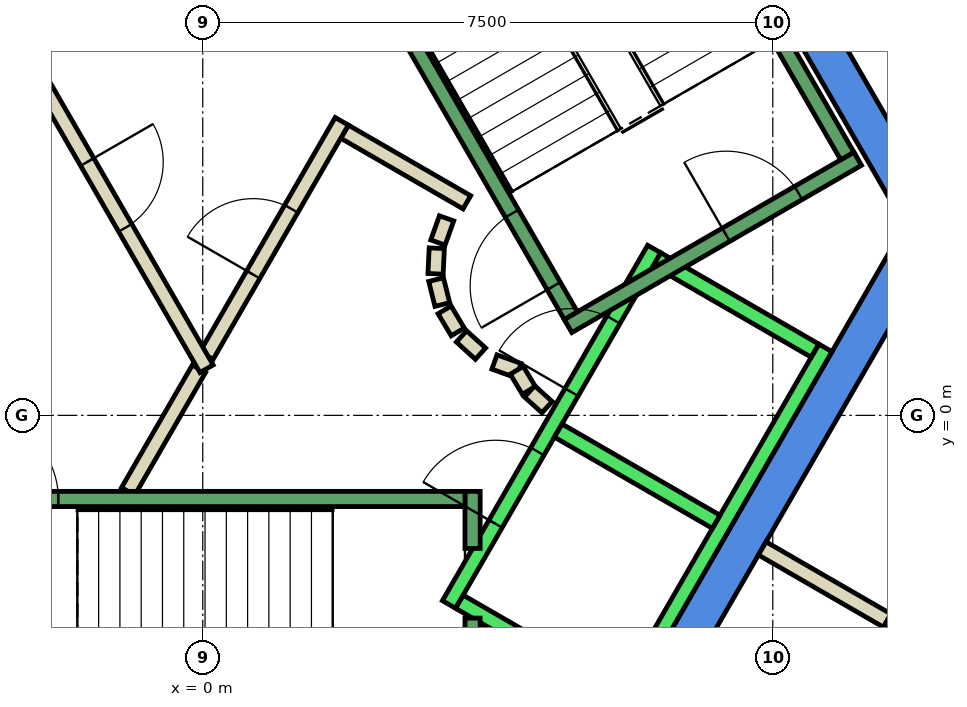
"""IFC4 building model, lengths in metres.
Left out: names, types, materials, properties, quantities, classifications, styles, units other than length and angle.
Written with IfcOpenShell. Run it as: python <this file> out.ifc"""

import sys

from ifc_helpers import new_model, si_unit, direction, frame, frame_2d, origin, place, context, subcontext, project, spatial, polyline, rectangle, outline, extrude, element, fill, save


model = new_model("IFC4")
c1 = context("Model", 3, precision=1e-05, world=origin(), true_north=direction((0.0, 1.0)))
c2 = subcontext(c1, "Body", "Model", "MODEL_VIEW")
j1 = project(units=[si_unit("LENGTHUNIT", "METRE"), si_unit("PLANEANGLEUNIT", "RADIAN")], contexts=[c1])
p1 = place(None, origin())
s1 = spatial("IfcSite", under=j1, at=p1, CompositionType="ELEMENT")
p2 = place(p1, origin())
s2 = spatial("IfcBuilding", under=s1, at=p2, CompositionType="ELEMENT")
p3 = place(p2, frame((0.0, 0.0, 340.4)))
s3 = spatial("IfcBuildingStorey", under=s2, at=p3, CompositionType="ELEMENT", Elevation=340.4)
p4 = place(p3, frame((0.0, 0.0, -0.45)))
e1 = element("IfcWall", 1, at=p4, inside=s3, PredefinedType="SHEAR", context=c2, shape_type="SweptSolid", body=[
    extrude(outline(polyline([(5.486, 9.998), (5.053, 9.748), (9.238, 2.5), (9.815, 2.5), (5.486, 9.998)])), origin(), (0.0, 0.0, 1.0), 4.6),
])
p5 = place(p3, frame((0.0, 0.0, -0.45)))
e2 = element("IfcWall", 2, at=p5, inside=s3, PredefinedType="SHEAR", context=c2, shape_type="SweptSolid", body=[
    extrude(outline(polyline([(4.907, -6.0), (9.815, 2.5), (9.238, 2.5), (4.619, -5.5), (4.907, -6.0)])), origin(), (0.0, 0.0, 1.0), 4.6),
])
p6 = place(p3, frame((-0.982, -1.0, 0.0), z_axis=(0.0, 0.0, 1.0), x_axis=(0.50024047865, 0.865886518847, 0.0)))
e3 = element("IfcWall", 3, at=p6, inside=s3, PredefinedType="PARTITIONING", context=c2, shape_type="SweptSolid", body=[
    extrude(rectangle(XDim=1.863, YDim=0.2, at=frame_2d((0.931, 0.0))), origin(), (0.0, 0.0, 1.0), 4.15),
])
p7 = place(p3, frame((1.866, 3.732, 0.0), z_axis=(0.0, 0.0, 1.0), x_axis=(0.866043361281, -0.499968895414, 0.0)))
e4 = element("IfcWall", 4, at=p7, inside=s3, PredefinedType="PARTITIONING", context=c2, shape_type="SweptSolid", body=[
    extrude(rectangle(XDim=1.858, YDim=0.2, at=frame_2d((0.929, 0.0))), origin(), (0.0, 0.0, 1.0), 4.15),
])
p8 = place(p3, frame((3.208, 2.592, 0.0), z_axis=(0.0, 0.0, 1.0), x_axis=(-0.337388820924, -0.941365382578, 0.0)))
e5 = element("IfcWall", 5, at=p8, inside=s3, PredefinedType="PARTITIONING", context=c2, shape_type="SweptSolid", body=[
    extrude(rectangle(XDim=0.338, YDim=0.2, at=frame_2d((0.169, 0.0))), origin(), (0.0, 0.0, 1.0), 4.15),
])
p9 = place(p3, frame((3.079, 2.199, 0.0), z_axis=(0.0, 0.0, 1.0), x_axis=(-0.047771483479, -0.998858290933, 0.0)))
e6 = element("IfcWall", 6, at=p9, inside=s3, PredefinedType="PARTITIONING", context=c2, shape_type="SweptSolid", body=[
    extrude(rectangle(XDim=0.337, YDim=0.2, at=frame_2d((0.169, 0.0))), origin(), (0.0, 0.0, 1.0), 4.15),
])
p10 = place(p3, frame((3.07, 1.786, 0.0), z_axis=(0.0, 0.0, 1.0), x_axis=(0.242705583207, -0.970099994784, 0.0)))
e7 = element("IfcWall", 7, at=p10, inside=s3, PredefinedType="PARTITIONING", context=c2, shape_type="SweptSolid", body=[
    extrude(rectangle(XDim=0.338, YDim=0.2, at=frame_2d((0.169, 0.0))), origin(), (0.0, 0.0, 1.0), 4.15),
])
for number, where, z_axis, x_axis in (
    (8, (3.182, 1.388, 0.0), (0.0, 0.0, 1.0), (0.512, -0.859, 0.0)),
    (9, (3.404, 1.039, 0.0), (0.0, 0.0, 1.0), (0.74, -0.672, 0.0)),
):
    element("IfcWall", number, at=place(p3, frame(where, z_axis=z_axis, x_axis=x_axis)), inside=s3, PredefinedType="PARTITIONING", context=c2, shape_type="SweptSolid", body=[
        extrude(rectangle(XDim=0.338, YDim=0.2, at=frame_2d((0.169, 0.0))), origin(), (0.0, 0.0, 1.0), 4.15),
    ])
p11 = place(p3, frame((3.838, 0.702, 0.0), z_axis=(0.0, 0.0, 1.0), x_axis=(0.941035081519, -0.338308993895, 0.0)))
e10 = element("IfcWall", 10, at=p11, inside=s3, PredefinedType="PARTITIONING", context=c2, shape_type="SweptSolid", body=[
    extrude(rectangle(XDim=0.337, YDim=0.2, at=frame_2d((0.168, 0.0))), origin(), (0.0, 0.0, 1.0), 4.15),
])
p12 = place(p3, frame((4.132, 0.593, 0.0), z_axis=(0.0, 0.0, 1.0), x_axis=(0.513561617048, -0.858052717201, 0.0)))
e11 = element("IfcWall", 11, at=p12, inside=s3, PredefinedType="PARTITIONING", context=c2, shape_type="SweptSolid", body=[
    extrude(rectangle(XDim=0.308, YDim=0.2, at=frame_2d((0.154, 0.0))), origin(), (0.0, 0.0, 1.0), 4.15),
])
p13 = place(p3, frame((4.301, 0.315, 0.0), z_axis=(0.0, 0.0, 1.0), x_axis=(0.741798017506, -0.670623367639, 0.0)))
e12 = element("IfcWall", 12, at=p13, inside=s3, PredefinedType="PARTITIONING", context=c2, shape_type="SweptSolid", body=[
    extrude(rectangle(XDim=0.309, YDim=0.2, at=frame_2d((0.154, 0.0))), origin(), (0.0, 0.0, 1.0), 4.15),
])
p14 = place(p3, frame((0.05, 0.787, 0.0), z_axis=(0.0, 0.0, 1.0), x_axis=(0.499954076797, 0.866051915934, 0.0)))
e13 = element("IfcWall", 13, at=p14, inside=s3, PredefinedType="PARTITIONING", context=c2, shape_type="SweptSolid", body=[
    extrude(rectangle(XDim=3.558, YDim=0.2, at=frame_2d((1.779, 0.0))), origin(), (0.0, 0.0, 1.0), 4.15),
])
p15 = place(p14, frame((1.229, 0.0, 0.0)))
e14 = element("IfcOpeningElement", 14, at=p15, cuts=e13, PredefinedType="OPENING", context=c2, shape_type="SweptSolid", body=[
    extrude(rectangle(XDim=1.0, YDim=2.1, at=frame_2d((0.5, 1.05))), frame((0.0, 0.11, 0.0), z_axis=(0.0, -1.0, 0.0), x_axis=(1.0, 0.0, 0.0)), (0.0, 0.0, 1.0), 0.22),
])
p16 = place(p3, frame((-2.54, 5.1, 0.0), z_axis=(0.0, 0.0, 1.0), x_axis=(0.499925051871, -0.866068670783, 0.0)))
e15 = element("IfcWall", 15, at=p16, inside=s3, PredefinedType="PARTITIONING", context=c2, shape_type="SweptSolid", body=[
    extrude(rectangle(XDim=5.181, YDim=0.2, at=frame_2d((2.59, 0.0))), origin(), (0.0, 0.0, 1.0), 4.15),
])
p17 = place(p16, frame((2.04, 0.0, 0.0)))
e16 = element("IfcOpeningElement", 16, at=p17, cuts=e15, PredefinedType="OPENING", context=c2, shape_type="SweptSolid", body=[
    extrude(rectangle(XDim=1.0, YDim=2.1, at=frame_2d((0.5, 1.05))), frame((0.0, 0.11, 0.0), z_axis=(0.0, -1.0, 0.0), x_axis=(1.0, 0.0, 0.0)), (0.0, 0.0, 1.0), 0.22),
])
p18 = place(p3, frame((9.106, -2.728, 0.0), z_axis=(0.0, 0.0, 1.0), x_axis=(-0.500132879116, -0.865948672398, 0.0)))
e17 = element("IfcWall", 17, at=p18, inside=s3, PredefinedType="PARTITIONING", context=c2, shape_type="SweptSolid", body=[
    extrude(rectangle(XDim=3.879, YDim=0.2, at=frame_2d((1.939, 0.0))), origin(), (0.0, 0.0, 1.0), 4.15),
])
p19 = place(p18, frame((0.884, 0.0, 0.0)))
e18 = element("IfcOpeningElement", 18, at=p19, cuts=e17, PredefinedType="OPENING", context=c2, shape_type="SweptSolid", body=[
    extrude(rectangle(XDim=1.0, YDim=2.1, at=frame_2d((0.5, 1.05))), frame((0.0, 0.11, 0.0), z_axis=(0.0, -1.0, 0.0), x_axis=(1.0, 0.0, 0.0)), (0.0, 0.0, 1.0), 0.22),
])
p20 = place(p3, frame((7.361, -1.75, 0.0), z_axis=(0.0, 0.0, 1.0), x_axis=(0.865980106173, -0.500078449558, 0.0)))
e19 = element("IfcWall", 19, at=p20, inside=s3, PredefinedType="PARTITIONING", context=c2, shape_type="SweptSolid", body=[
    extrude(rectangle(XDim=1.9, YDim=0.2, at=frame_2d((0.95, 0.0))), origin(), (0.0, 0.0, 1.0), 4.15),
])
p21 = place(p3, frame((19.664, -8.853, 0.0), z_axis=(0.0, 0.0, 1.0), x_axis=(-0.866035935173, 0.499981758657, 0.0)))
e20 = element("IfcWall", 20, at=p21, inside=s3, PredefinedType="PARTITIONING", context=c2, shape_type="SweptSolid", body=[
    extrude(rectangle(XDim=12.307, YDim=0.15, at=frame_2d((6.153, 0.0))), origin(), (0.0, 0.0, 1.0), 4.15),
])
p22 = place(p3, frame((8.736, 8.368, 0.0), z_axis=(0.0, 0.0, 1.0), x_axis=(0.499995994493, -0.866027716353, 0.0)))
e21 = element("IfcWall", 21, at=p22, inside=s3, PredefinedType="PARTITIONING", context=c2, shape_type="SweptSolid", body=[
    extrude(rectangle(XDim=6.876, YDim=0.2, at=frame_2d((3.438, 0.0))), origin(), (0.0, 0.0, 1.0), 4.15),
])
p23 = place(p22, frame((5.726, 0.0, 0.0)))
e22 = element("IfcOpeningElement", 22, at=p23, cuts=e21, PredefinedType="OPENING", context=c2, shape_type="SweptSolid", body=[
    extrude(rectangle(XDim=1.0, YDim=2.1, at=frame_2d((0.5, 1.05))), frame((0.0, 0.11, 0.0), z_axis=(0.0, -1.0, 0.0), x_axis=(1.0, 0.0, 0.0)), (0.0, 0.0, 1.0), 0.22),
])
p24 = place(p3, frame((3.24, -2.488, 0.0), z_axis=(0.0, 0.0, 1.0), x_axis=(0.500034260056, 0.866005622828, 0.0)))
e23 = element("IfcWall", 23, at=p24, inside=s3, PredefinedType="STANDARD", context=c2, shape_type="SweptSolid", body=[
    extrude(rectangle(XDim=5.399, YDim=0.2, at=frame_2d((2.7, 0.0))), origin(), (0.0, 0.0, 1.0), 4.15),
])
p25 = place(p24, frame((3.225, 0.0, 0.0)))
e24 = element("IfcOpeningElement", 24, at=p25, cuts=e23, PredefinedType="OPENING", context=c2, shape_type="SweptSolid", body=[
    extrude(rectangle(XDim=1.1, YDim=2.1, at=frame_2d((0.55, 1.05))), frame((0.0, 0.11, 0.0), z_axis=(0.0, -1.0, 0.0), x_axis=(1.0, 0.0, 0.0)), (0.0, 0.0, 1.0), 0.22),
])
p26 = place(p24, frame((1.225, 0.0, 0.0)))
e25 = element("IfcOpeningElement", 25, at=p26, cuts=e23, PredefinedType="OPENING", context=c2, shape_type="SweptSolid", body=[
    extrude(rectangle(XDim=1.1, YDim=2.1, at=frame_2d((0.55, 1.05))), frame((0.0, 0.11, 0.0), z_axis=(0.0, -1.0, 0.0), x_axis=(1.0, 0.0, 0.0)), (0.0, 0.0, 1.0), 0.22),
])
p27 = place(p3, frame((5.492, -3.788, 0.0), z_axis=(0.0, 0.0, 1.0), x_axis=(0.500034260056, 0.866005622828, 0.0)))
e26 = element("IfcWall", 26, at=p27, inside=s3, PredefinedType="STANDARD", context=c2, shape_type="SweptSolid", body=[
    extrude(rectangle(XDim=5.399, YDim=0.2, at=frame_2d((2.7, 0.0))), origin(), (0.0, 0.0, 1.0), 4.15),
])
p28 = place(p3, frame((3.377, -2.452, 0.0), z_axis=(0.0, 0.0, 1.0), x_axis=(0.865955154139, -0.50012165622, 0.0)))
e27 = element("IfcWall", 27, at=p28, inside=s3, PredefinedType="STANDARD", context=c2, shape_type="SweptSolid", body=[
    extrude(rectangle(XDim=2.4, YDim=0.2, at=frame_2d((1.2, 0.0))), origin(), (0.0, 0.0, 1.0), 4.15),
])
for number, where, z_axis, x_axis in (
    (28, (4.677, -0.2, 0.0), (0.0, 0.0, 1.0), (0.866, -0.5, 0.0)),
    (29, (5.977, 2.052, 0.0), (0.0, 0.0, 1.0), (0.866, -0.5, 0.0)),
):
    element("IfcWall", number, at=place(p3, frame(where, z_axis=z_axis, x_axis=x_axis)), inside=s3, PredefinedType="STANDARD", context=c2, shape_type="SweptSolid", body=[
        extrude(rectangle(XDim=2.399, YDim=0.2, at=frame_2d((1.2, 0.0))), origin(), (0.0, 0.0, 1.0), 4.15),
    ])
p29 = place(p3, frame((3.55, -2.667, 0.0), z_axis=(0.0, 0.0, 1.0), x_axis=(0.0, -1.0, 0.0)))
e30 = element("IfcWall", 30, at=p29, inside=s3, PredefinedType="STANDARD", context=c2, shape_type="SweptSolid", body=[
    extrude(rectangle(XDim=2.733, YDim=0.2, at=frame_2d((1.366, 0.0))), origin(), (0.0, 0.0, 1.0), 4.15),
])
p30 = place(p3, frame((3.55, -1.0, 0.0), z_axis=(0.0, 0.0, 1.0), x_axis=(0.0, -1.0, 0.0)))
e31 = element("IfcWall", 31, at=p30, inside=s3, PredefinedType="STANDARD", context=c2, shape_type="SweptSolid", body=[
    extrude(rectangle(XDim=0.751, YDim=0.2, at=frame_2d((0.375, 0.0))), origin(), (0.0, 0.0, 1.0), 4.15),
])
p31 = place(p3, frame((-3.45, -1.1, 0.0), z_axis=(0.0, 0.0, 1.0), x_axis=(1.0, 0.0, 0.0)))
e32 = element("IfcWall", 32, at=p31, inside=s3, PredefinedType="STANDARD", context=c2, shape_type="SweptSolid", body=[
    extrude(rectangle(XDim=6.9, YDim=0.2, at=frame_2d((3.45, 0.0))), origin(), (0.0, 0.0, 1.0), 4.15),
])
p32 = place(p31, frame((0.45, 0.0, 0.0)))
e33 = element("IfcOpeningElement", 33, at=p32, cuts=e32, PredefinedType="OPENING", context=c2, shape_type="SweptSolid", body=[
    extrude(rectangle(XDim=1.1, YDim=2.2, at=frame_2d((0.55, 1.1))), frame((0.0, 0.11, 0.0), z_axis=(0.0, -1.0, 0.0), x_axis=(1.0, 0.0, 0.0)), (0.0, 0.0, 1.0), 0.22),
])
p33 = place(p3, frame((4.806, 1.176, 0.0), z_axis=(0.0, 0.0, 1.0), x_axis=(0.866059941101, 0.499940174841, 0.0)))
e34 = element("IfcWall", 34, at=p33, inside=s3, PredefinedType="STANDARD", context=c2, shape_type="SweptSolid", body=[
    extrude(rectangle(XDim=4.4, YDim=0.2, at=frame_2d((2.2, 0.0))), origin(), (0.0, 0.0, 1.0), 4.15),
])
p34 = place(p33, frame((2.4, 0.0, 0.0)))
e35 = element("IfcOpeningElement", 35, at=p34, cuts=e34, PredefinedType="OPENING", context=c2, shape_type="SweptSolid", body=[
    extrude(rectangle(XDim=1.1, YDim=2.2, at=frame_2d((0.55, 1.1))), frame((0.0, 0.11, 0.0), z_axis=(0.0, -1.0, 0.0), x_axis=(1.0, 0.0, 0.0)), (0.0, 0.0, 1.0), 0.22),
])
p35 = place(p3, frame((4.843, 1.312, 0.0), z_axis=(0.0, 0.0, 1.0), x_axis=(-0.499963383562, 0.866046543262, 0.0)))
e36 = element("IfcWall", 36, at=p35, inside=s3, PredefinedType="STANDARD", context=c2, shape_type="SweptSolid", body=[
    extrude(rectangle(XDim=6.9, YDim=0.2, at=frame_2d((3.45, 0.0))), origin(), (0.0, 0.0, 1.0), 4.15),
])
p36 = place(p35, frame((0.45, 0.0, 0.0)))
e37 = element("IfcOpeningElement", 37, at=p36, cuts=e36, PredefinedType="OPENING", context=c2, shape_type="SweptSolid", body=[
    extrude(rectangle(XDim=1.1, YDim=2.2, at=frame_2d((0.55, 1.1))), frame((0.0, 0.11, 0.0), z_axis=(0.0, -1.0, 0.0), x_axis=(1.0, 0.0, 0.0)), (0.0, 0.0, 1.0), 0.22),
])
p37 = place(p3, frame((8.48, 3.412, 0.0), z_axis=(0.0, 0.0, 1.0), x_axis=(-0.499978703459, 0.866037698999, 0.0)))
e38 = element("IfcWall", 38, at=p37, inside=s3, PredefinedType="STANDARD", context=c2, shape_type="SweptSolid", body=[
    extrude(rectangle(XDim=6.9, YDim=0.2, at=frame_2d((3.45, 0.0))), origin(), (0.0, 0.0, 1.0), 4.15),
])
p38 = place(p3, frame((-1.393, 7.288, 0.0), z_axis=(0.0, 0.0, 1.0), x_axis=(-0.499963383562, -0.866046543262, 0.0)))
e39 = element("IfcWall", 39, at=p38, inside=s3, PredefinedType="STANDARD", context=c2, shape_type="SweptSolid", body=[
    extrude(rectangle(XDim=6.9, YDim=0.2, at=frame_2d((3.45, 0.0))), origin(), (0.0, 0.0, 1.0), 4.15),
])
p39 = place(p38, frame((0.45, 0.0, 0.0)))
e40 = element("IfcOpeningElement", 40, at=p39, cuts=e39, PredefinedType="OPENING", context=c2, shape_type="SweptSolid", body=[
    extrude(rectangle(XDim=1.1, YDim=2.2, at=frame_2d((0.55, 1.1))), frame((0.0, 0.11, 0.0), z_axis=(0.0, -1.0, 0.0), x_axis=(1.0, 0.0, 0.0)), (0.0, 0.0, 1.0), 0.22),
])
p40 = place(p15, origin())
e41 = element("IfcDoor", 41, at=p40, inside=s3, OperationType="SINGLE_SWING_RIGHT", PredefinedType="DOOR", context=c2, shape_type="SweptSolid", body=[
    extrude(rectangle(XDim=1.0, YDim=2.1, at=frame_2d((0.5, 1.05))), frame((0.0, 0.025, 0.0), z_axis=(0.0, -1.0, 0.0), x_axis=(1.0, 0.0, 0.0)), (0.0, 0.0, 1.0), 0.05),
])
fill(e14, e41)
p41 = place(p17, origin())
e42 = element("IfcDoor", 42, at=p41, inside=s3, OperationType="SINGLE_SWING_RIGHT", PredefinedType="DOOR", context=c2, shape_type="SweptSolid", body=[
    extrude(rectangle(XDim=1.0, YDim=2.1, at=frame_2d((0.5, 1.05))), frame((0.0, 0.025, 0.0), z_axis=(0.0, -1.0, 0.0), x_axis=(1.0, 0.0, 0.0)), (0.0, 0.0, 1.0), 0.05),
])
fill(e16, e42)
p42 = place(p25, origin())
e43 = element("IfcDoor", 43, at=p42, inside=s3, OperationType="SLIDING_TO_LEFT", PredefinedType="DOOR", context=c2, shape_type="SweptSolid", body=[
    extrude(rectangle(XDim=1.1, YDim=2.1, at=frame_2d((0.55, 1.05))), frame((0.0, 0.025, 0.0), z_axis=(0.0, -1.0, 0.0), x_axis=(1.0, 0.0, 0.0)), (0.0, 0.0, 1.0), 0.05),
])
fill(e24, e43)
p43 = place(p26, origin())
e44 = element("IfcDoor", 44, at=p43, inside=s3, OperationType="SLIDING_TO_LEFT", PredefinedType="DOOR", context=c2, shape_type="SweptSolid", body=[
    extrude(rectangle(XDim=1.1, YDim=2.1, at=frame_2d((0.55, 1.05))), frame((0.0, 0.025, 0.0), z_axis=(0.0, -1.0, 0.0), x_axis=(1.0, 0.0, 0.0)), (0.0, 0.0, 1.0), 0.05),
])
fill(e25, e44)
p44 = place(p32, origin())
e45 = element("IfcDoor", 45, at=p44, inside=s3, OperationType="SINGLE_SWING_LEFT", PredefinedType="DOOR", context=c2, shape_type="SweptSolid", body=[
    extrude(rectangle(XDim=1.1, YDim=2.2, at=frame_2d((0.55, 1.1))), frame((0.0, 0.025, 0.0), z_axis=(0.0, -1.0, 0.0), x_axis=(1.0, 0.0, 0.0)), (0.0, 0.0, 1.0), 0.05),
])
fill(e33, e45)
p45 = place(p36, origin())
e46 = element("IfcDoor", 46, at=p45, inside=s3, OperationType="SINGLE_SWING_LEFT", PredefinedType="DOOR", context=c2, shape_type="SweptSolid", body=[
    extrude(rectangle(XDim=1.1, YDim=2.2, at=frame_2d((0.55, 1.1))), frame((0.0, 0.025, 0.0), z_axis=(0.0, -1.0, 0.0), x_axis=(1.0, 0.0, 0.0)), (0.0, 0.0, 1.0), 0.05),
])
fill(e37, e46)
p46 = place(p34, origin())
e47 = element("IfcDoor", 47, at=p46, inside=s3, OperationType="SINGLE_SWING_LEFT", PredefinedType="DOOR", context=c2, shape_type="SweptSolid", body=[
    extrude(rectangle(XDim=1.1, YDim=2.2, at=frame_2d((0.55, 1.1))), frame((0.0, 0.025, 0.0), z_axis=(0.0, -1.0, 0.0), x_axis=(1.0, 0.0, 0.0)), (0.0, 0.0, 1.0), 0.05),
])
fill(e35, e47)
save(model, sys.argv[1])
